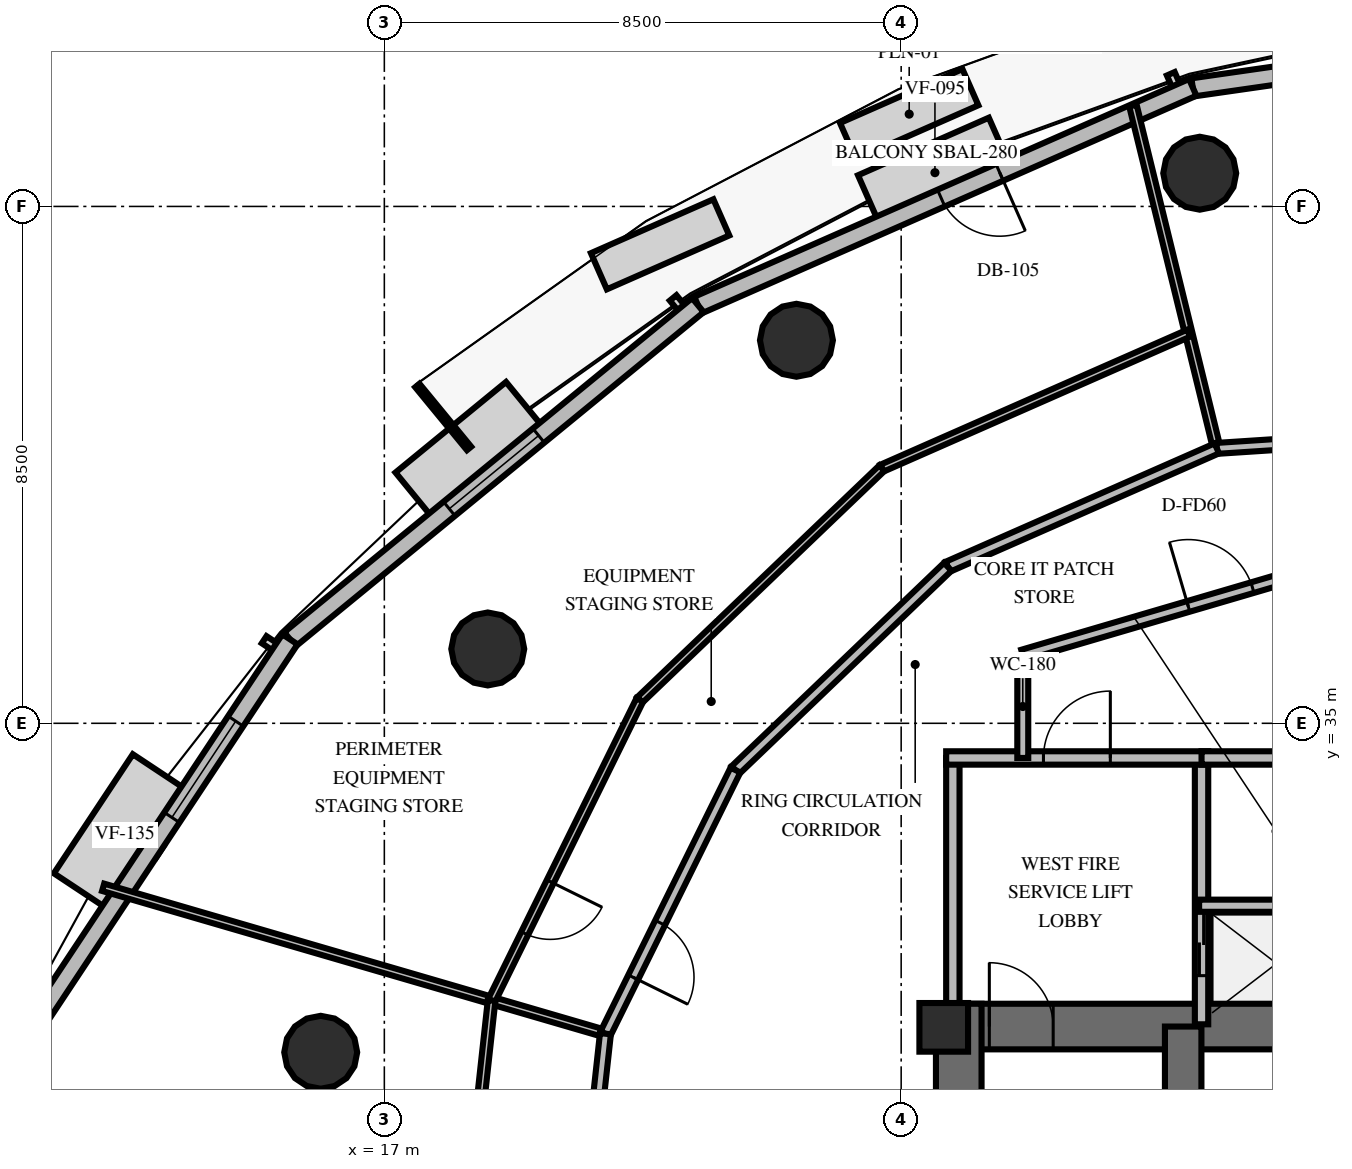
"""IFC4 building model, lengths in metres.
Left out: names, types, materials, properties, quantities, classifications, styles, units other than length and angle.
Written with IfcOpenShell. Run it as: python <this file> out.ifc"""

import sys

from ifc_helpers import new_model, si_unit, direction, frame, frame_2d, origin, origin_2d, place, context, subcontext, project, spatial, rectangle, circle, extrude, element, fill, save


model = new_model("IFC4")
c1 = context("Model", 3, precision=1e-05, world=origin(), true_north=direction((0.0, 1.0)))
c2 = subcontext(c1, "Body", "Model", "MODEL_VIEW")
j1 = project(units=[si_unit("LENGTHUNIT", "METRE"), si_unit("PLANEANGLEUNIT", "RADIAN")], contexts=[c1])
p1 = place(None, origin())
s1 = spatial("IfcSite", under=j1, at=p1, CompositionType="ELEMENT")
p2 = place(p1, origin())
s2 = spatial("IfcBuilding", under=s1, at=p2, CompositionType="ELEMENT")
p3 = place(p2, frame((0.0, 0.0, 133.8)))
s3 = spatial("IfcBuildingStorey", under=s2, at=p3, CompositionType="ELEMENT", Elevation=133.8)
p4 = place(p3, frame((26.072, 30.013, 0.0), z_axis=(0.0, 0.0, 1.0), x_axis=(1.0, 0.0, 0.0)))
e1 = element("IfcWall", 1, at=p4, inside=s3, PredefinedType="SHEAR", context=c2, shape_type="SweptSolid", body=[
    extrude(rectangle(XDim=15.866, YDim=0.75, at=frame_2d((7.933, 0.0))), origin(), (0.0, 0.0, 1.0), 4.0),
])
p5 = place(p4, frame((0.878, 0.0, 0.0)))
e2 = element("IfcOpeningElement", 2, at=p5, cuts=e1, PredefinedType="OPENING", context=c2, shape_type="SweptSolid", body=[
    extrude(rectangle(XDim=1.05, YDim=2.15, at=frame_2d((0.525, 1.075))), frame((0.0, 0.385, 0.0), z_axis=(0.0, -1.0, 0.0), x_axis=(1.0, 0.0, 0.0)), (0.0, 0.0, 1.0), 0.77),
])
p6 = place(p4, frame((13.928, 0.0, 0.0)))
e3 = element("IfcOpeningElement", 3, at=p6, cuts=e1, PredefinedType="OPENING", context=c2, shape_type="SweptSolid", body=[
    extrude(rectangle(XDim=1.05, YDim=2.15, at=frame_2d((0.525, 1.075))), frame((0.0, 0.385, 0.0), z_axis=(0.0, -1.0, 0.0), x_axis=(1.0, 0.0, 0.0)), (0.0, 0.0, 1.0), 0.77),
])
p7 = place(p4, frame((7.378, 0.0, 0.0)))
e4 = element("IfcOpeningElement", 4, at=p7, cuts=e1, PredefinedType="OPENING", context=c2, shape_type="SweptSolid", body=[
    extrude(rectangle(XDim=1.1, YDim=2.15, at=frame_2d((0.55, 1.075))), frame((0.0, 0.385, 0.0), z_axis=(0.0, -1.0, 0.0), x_axis=(1.0, 0.0, 0.0)), (0.0, 0.0, 1.0), 0.77),
])
p8 = place(p3, frame((26.447, 19.812, 0.0), z_axis=(0.0, 0.0, 1.0), x_axis=(0.0, 1.0, 0.0)))
e5 = element("IfcWall", 5, at=p8, inside=s3, PredefinedType="SHEAR", context=c2, shape_type="SweptSolid", body=[
    extrude(rectangle(XDim=10.576, YDim=0.75, at=frame_2d((5.288, 0.0))), origin(), (0.0, 0.0, 1.0), 4.0),
])
p9 = place(p3, frame((30.138, 20.187, 0.0), z_axis=(0.0, 0.0, 1.0), x_axis=(0.0, 1.0, 0.0)))
e6 = element("IfcWall", 6, at=p9, inside=s3, PredefinedType="SHEAR", context=c2, shape_type="SweptSolid", body=[
    extrude(rectangle(XDim=9.826, YDim=0.6, at=frame_2d((4.913, 0.0))), origin(), (0.0, 0.0, 1.0), 4.0),
])
p10 = place(p3, frame((26.2, 30.0, 0.0), z_axis=(0.0, 0.0, 1.0), x_axis=(1.0, 0.0, 0.0)))
e7 = element("IfcColumn", 7, at=p10, inside=s3, PredefinedType="PILASTER", context=c2, shape_type="SweptSolid", body=[
    extrude(rectangle(XDim=0.8, YDim=0.8, at=origin_2d()), origin(), (0.0, 0.0, 1.0), 4.0),
])
for number, where, z_axis, x_axis in (
    (8, (30.41, 44.046, 0.0), (0.0, 0.0, 1.0), (1.0, 0.0, 0.0)),
    (9, (23.778, 41.299, 0.0), (0.0, 0.0, 1.0), (1.0, 0.0, 0.0)),
    (10, (18.701, 36.222, 0.0), (0.0, 0.0, 1.0), (1.0, 0.0, 0.0)),
    (11, (15.954, 29.59, 0.0), (0.0, 0.0, 1.0), (1.0, 0.0, 0.0)),
):
    element("IfcColumn", number, at=place(p3, frame(where, z_axis=z_axis, x_axis=x_axis)), inside=s3, PredefinedType="COLUMN", context=c2, shape_type="SweptSolid", body=[
        extrude(circle(Radius=0.6, at=origin_2d()), origin(), (0.0, 0.0, 1.0), 4.0),
    ])
p11 = place(p3, frame((38.88, 46.692, 0.0), z_axis=(0.0, 0.0, 1.0), x_axis=(-0.989832051035, -0.142241030455, 0.0)))
e12 = element("IfcWall", 12, at=p11, inside=s3, PredefinedType="SOLIDWALL", context=c2, shape_type="SweptSolid", body=[
    extrude(rectangle(XDim=8.673, YDim=0.3, at=frame_2d((4.336, 0.0))), origin(), (0.0, 0.0, 1.0), 2.9),
])
p12 = place(p11, frame((3.386, 0.0, 0.8)))
e13 = element("IfcOpeningElement", 13, at=p12, cuts=e12, PredefinedType="OPENING", context=c2, shape_type="SweptSolid", body=[
    extrude(rectangle(XDim=1.9, YDim=1.95, at=frame_2d((0.95, 0.975))), frame((0.0, 0.16, 0.0), z_axis=(0.0, -1.0, 0.0), x_axis=(1.0, 0.0, 0.0)), (0.0, 0.0, 1.0), 0.32),
])
p13 = place(p3, frame((30.295, 45.458, 0.0), z_axis=(0.0, 0.0, 1.0), x_axis=(-0.915305719245, -0.402759779916, 0.0)))
e14 = element("IfcWall", 14, at=p13, inside=s3, PredefinedType="SOLIDWALL", context=c2, shape_type="SweptSolid", body=[
    extrude(rectangle(XDim=8.891, YDim=0.3, at=frame_2d((4.445, 0.0))), origin(), (0.0, 0.0, 1.0), 2.9),
])
p14 = place(p13, frame((3.47, 0.0, 0.0)))
e15 = element("IfcOpeningElement", 15, at=p14, cuts=e14, PredefinedType="OPENING", context=c2, shape_type="SweptSolid", body=[
    extrude(rectangle(XDim=1.05, YDim=2.15, at=frame_2d((0.525, 1.075))), frame((0.0, 0.16, 0.0), z_axis=(0.0, -1.0, 0.0), x_axis=(1.0, 0.0, 0.0)), (0.0, 0.0, 1.0), 0.32),
])
p15 = place(p3, frame((22.157, 41.877, 0.0), z_axis=(0.0, 0.0, 1.0), x_axis=(-0.773602244152, -0.633671498367, 0.0)))
e16 = element("IfcWall", 16, at=p15, inside=s3, PredefinedType="SOLIDWALL", context=c2, shape_type="SweptSolid", body=[
    extrude(rectangle(XDim=8.673, YDim=0.3, at=frame_2d((4.336, 0.0))), origin(), (0.0, 0.0, 1.0), 2.9),
])
p16 = place(p15, frame((3.386, 0.0, 0.8)))
e17 = element("IfcOpeningElement", 17, at=p16, cuts=e16, PredefinedType="OPENING", context=c2, shape_type="SweptSolid", body=[
    extrude(rectangle(XDim=1.9, YDim=1.95, at=frame_2d((0.95, 0.975))), frame((0.0, 0.16, 0.0), z_axis=(0.0, -1.0, 0.0), x_axis=(1.0, 0.0, 0.0)), (0.0, 0.0, 1.0), 0.32),
])
p17 = place(p3, frame((15.448, 36.381, 0.0), z_axis=(0.0, 0.0, 1.0), x_axis=(-0.552401321334, -0.833578298775, 0.0)))
e18 = element("IfcWall", 18, at=p17, inside=s3, PredefinedType="SOLIDWALL", context=c2, shape_type="SweptSolid", body=[
    extrude(rectangle(XDim=8.095, YDim=0.3, at=frame_2d((4.047, 0.0))), origin(), (0.0, 0.0, 1.0), 2.9),
])
p18 = place(p17, frame((1.615, 0.0, 0.8)))
e19 = element("IfcOpeningElement", 19, at=p18, cuts=e18, PredefinedType="OPENING", context=c2, shape_type="SweptSolid", body=[
    extrude(rectangle(XDim=1.9, YDim=1.95, at=frame_2d((0.95, 0.975))), frame((0.0, 0.16, 0.0), z_axis=(0.0, -1.0, 0.0), x_axis=(1.0, 0.0, 0.0)), (0.0, 0.0, 1.0), 0.32),
])
p19 = place(p3, frame((26.35, 30.05, 0.0), z_axis=(0.0, 0.0, 1.0), x_axis=(0.0, 1.0, 0.0)))
e20 = element("IfcWall", 20, at=p19, inside=s3, PredefinedType="SOLIDWALL", context=c2, shape_type="SweptSolid", body=[
    extrude(rectangle(XDim=4.38, YDim=0.22, at=frame_2d((2.19, 0.0))), origin(), (0.0, 0.0, 1.0), 2.8),
])
p20 = place(p3, frame((30.44, 30.05, 0.0), z_axis=(0.0, 0.0, 1.0), x_axis=(0.0, 1.0, 0.0)))
e21 = element("IfcWall", 21, at=p20, inside=s3, PredefinedType="SOLIDWALL", context=c2, shape_type="SweptSolid", body=[
    extrude(rectangle(XDim=4.38, YDim=0.22, at=frame_2d((2.19, 0.0))), origin(), (0.0, 0.0, 1.0), 2.8),
])
p21 = place(p20, frame((0.8, 0.0, 0.0)))
e22 = element("IfcOpeningElement", 22, at=p21, cuts=e21, PredefinedType="OPENING", context=c2, shape_type="SweptSolid", body=[
    extrude(rectangle(XDim=1.05, YDim=2.1, at=frame_2d((0.525, 1.05))), frame((0.0, 0.12, 0.0), z_axis=(0.0, -1.0, 0.0), x_axis=(1.0, 0.0, 0.0)), (0.0, 0.0, 1.0), 0.24),
])
p22 = place(p3, frame((26.24, 34.43, 0.0), z_axis=(0.0, 0.0, 1.0), x_axis=(1.0, 0.0, 0.0)))
e23 = element("IfcWall", 23, at=p22, inside=s3, PredefinedType="SOLIDWALL", context=c2, shape_type="SweptSolid", body=[
    extrude(rectangle(XDim=4.31, YDim=0.22, at=frame_2d((2.155, 0.0))), origin(), (0.0, 0.0, 1.0), 2.8),
])
p23 = place(p22, frame((1.6, 0.0, 0.0)))
e24 = element("IfcOpeningElement", 24, at=p23, cuts=e23, PredefinedType="OPENING", context=c2, shape_type="SweptSolid", body=[
    extrude(rectangle(XDim=1.1, YDim=2.15, at=frame_2d((0.55, 1.075))), frame((0.0, 0.12, 0.0), z_axis=(0.0, -1.0, 0.0), x_axis=(1.0, 0.0, 0.0)), (0.0, 0.0, 1.0), 0.24),
])
p24 = place(p3, frame((30.4, 32.0, 0.0), z_axis=(0.0, 0.0, 1.0), x_axis=(1.0, 0.0, 0.0)))
e25 = element("IfcWall", 25, at=p24, inside=s3, PredefinedType="SOLIDWALL", context=c2, shape_type="SweptSolid", body=[
    extrude(rectangle(XDim=2.55, YDim=0.2, at=frame_2d((1.275, 0.0))), origin(), (0.0, 0.0, 1.0), 2.8),
])
p25 = place(p3, frame((30.44, 34.43, 0.0), z_axis=(0.0, 0.0, 1.0), x_axis=(1.0, 0.0, 0.0)))
e26 = element("IfcWall", 26, at=p25, inside=s3, PredefinedType="SOLIDWALL", context=c2, shape_type="SweptSolid", body=[
    extrude(rectangle(XDim=7.12, YDim=0.22, at=frame_2d((3.56, 0.0))), origin(), (0.0, 0.0, 1.0), 2.8),
])
p26 = place(p25, frame((3.01, 0.0, 0.0)))
e27 = element("IfcOpeningElement", 27, at=p26, cuts=e26, PredefinedType="OPENING", context=c2, shape_type="SweptSolid", body=[
    extrude(rectangle(XDim=1.1, YDim=2.15, at=frame_2d((0.55, 1.075))), frame((0.0, 0.12, 0.0), z_axis=(0.0, -1.0, 0.0), x_axis=(1.0, 0.0, 0.0)), (0.0, 0.0, 1.0), 0.24),
])
p27 = place(p3, frame((27.5, 34.43, 0.0), z_axis=(0.0, 0.0, 1.0), x_axis=(0.0, 1.0, 0.0)))
e28 = element("IfcWall", 28, at=p27, inside=s3, PredefinedType="PARTITIONING", context=c2, shape_type="SweptSolid", body=[
    extrude(rectangle(XDim=1.693, YDim=0.18, at=frame_2d((0.846, 0.0))), origin(), (0.0, 0.0, 1.0), 2.8),
])
p28 = place(p3, frame((27.5, 36.123, 0.0), z_axis=(0.0, 0.0, 1.0), x_axis=(0.959546654541, 0.281549671923, 0.0)))
e29 = element("IfcWall", 29, at=p28, inside=s3, PredefinedType="PARTITIONING", context=c2, shape_type="SweptSolid", body=[
    extrude(rectangle(XDim=6.774, YDim=0.18, at=frame_2d((3.387, 0.0))), origin(), (0.0, 0.0, 1.0), 2.8),
])
p29 = place(p28, frame((2.837, 0.0, 0.0)))
e30 = element("IfcOpeningElement", 30, at=p29, cuts=e29, PredefinedType="OPENING", context=c2, shape_type="SweptSolid", body=[
    extrude(rectangle(XDim=1.1, YDim=2.15, at=frame_2d((0.55, 1.075))), frame((0.0, 0.1, 0.0), z_axis=(0.0, -1.0, 0.0), x_axis=(1.0, 0.0, 0.0)), (0.0, 0.0, 1.0), 0.2),
])
p30 = place(p3, frame((30.691, 39.521, 0.0), z_axis=(0.0, 0.0, 1.0), x_axis=(-0.23768243705, 0.971342915307, 0.0)))
e31 = element("IfcWall", 31, at=p30, inside=s3, PredefinedType="PARTITIONING", context=c2, shape_type="SweptSolid", body=[
    extrude(rectangle(XDim=5.803, YDim=0.125, at=frame_2d((2.902, 0.0))), origin(), (0.0, 0.0, 1.0), 2.8),
])
p31 = place(p3, frame((35.515, 39.837, 0.0), z_axis=(0.0, 0.0, 1.0), x_axis=(-0.997855867804, -0.065449729474, 0.0)))
e32 = element("IfcWall", 32, at=p31, inside=s3, PredefinedType="PARTITIONING", context=c2, shape_type="SweptSolid", body=[
    extrude(rectangle(XDim=4.834, YDim=0.18, at=frame_2d((2.417, 0.0))), origin(), (0.0, 0.0, 1.0), 2.8),
])
p32 = place(p31, frame((0.996, 0.0, 0.0)))
e33 = element("IfcOpeningElement", 33, at=p32, cuts=e32, PredefinedType="OPENING", context=c2, shape_type="SweptSolid", body=[
    extrude(rectangle(XDim=1.15, YDim=2.15, at=frame_2d((0.575, 1.075))), frame((0.0, 0.1, 0.0), z_axis=(0.0, -1.0, 0.0), x_axis=(1.0, 0.0, 0.0)), (0.0, 0.0, 1.0), 0.2),
])
p33 = place(p3, frame((20.636, 29.895, 0.0), z_axis=(0.0, 0.0, 1.0), x_axis=(-0.960054321728, 0.279813686819, 0.0)))
e34 = element("IfcWall", 34, at=p33, inside=s3, PredefinedType="PARTITIONING", context=c2, shape_type="SweptSolid", body=[
    extrude(rectangle(XDim=8.605, YDim=0.125, at=frame_2d((4.302, 0.0))), origin(), (0.0, 0.0, 1.0), 2.8),
])
p34 = place(p3, frame((30.691, 39.521, 0.0), z_axis=(0.0, 0.0, 1.0), x_axis=(-0.915325457772, -0.402714919459, 0.0)))
e35 = element("IfcWall", 35, at=p34, inside=s3, PredefinedType="PARTITIONING", context=c2, shape_type="SweptSolid", body=[
    extrude(rectangle(XDim=4.834, YDim=0.18, at=frame_2d((2.417, 0.0))), origin(), (0.0, 0.0, 1.0), 2.8),
])
p35 = place(p3, frame((26.267, 37.574, 0.0), z_axis=(0.0, 0.0, 1.0), x_axis=(-0.722341285912, -0.691536742818, 0.0)))
e36 = element("IfcWall", 36, at=p35, inside=s3, PredefinedType="PARTITIONING", context=c2, shape_type="SweptSolid", body=[
    extrude(rectangle(XDim=4.834, YDim=0.18, at=frame_2d((2.417, 0.0))), origin(), (0.0, 0.0, 1.0), 2.8),
])
p36 = place(p3, frame((22.774, 34.231, 0.0), z_axis=(0.0, 0.0, 1.0), x_axis=(-0.442338670076, -0.896848092463, 0.0)))
e37 = element("IfcWall", 37, at=p36, inside=s3, PredefinedType="PARTITIONING", context=c2, shape_type="SweptSolid", body=[
    extrude(rectangle(XDim=4.834, YDim=0.18, at=frame_2d((2.417, 0.0))), origin(), (0.0, 0.0, 1.0), 2.8),
])
p37 = place(p36, frame((2.801, 0.0, 0.0)))
e38 = element("IfcOpeningElement", 38, at=p37, cuts=e37, PredefinedType="OPENING", context=c2, shape_type="SweptSolid", body=[
    extrude(rectangle(XDim=1.0, YDim=2.15, at=frame_2d((0.5, 1.075))), frame((0.0, 0.1, 0.0), z_axis=(0.0, -1.0, 0.0), x_axis=(1.0, 0.0, 0.0)), (0.0, 0.0, 1.0), 0.2),
])
p38 = place(p3, frame((30.228, 41.415, 0.0), z_axis=(0.0, 0.0, 1.0), x_axis=(-0.915294129994, -0.402786116442, 0.0)))
e39 = element("IfcWall", 39, at=p38, inside=s3, PredefinedType="PARTITIONING", context=c2, shape_type="SweptSolid", body=[
    extrude(rectangle(XDim=5.511, YDim=0.125, at=frame_2d((2.756, 0.0))), origin(), (0.0, 0.0, 1.0), 2.8),
])
p39 = place(p3, frame((25.183, 39.195, 0.0), z_axis=(0.0, 0.0, 1.0), x_axis=(-0.722375329224, -0.691501181292, 0.0)))
e40 = element("IfcWall", 40, at=p39, inside=s3, PredefinedType="PARTITIONING", context=c2, shape_type="SweptSolid", body=[
    extrude(rectangle(XDim=5.512, YDim=0.125, at=frame_2d((2.756, 0.0))), origin(), (0.0, 0.0, 1.0), 2.8),
])
p40 = place(p3, frame((21.202, 35.384, 0.0), z_axis=(0.0, 0.0, 1.0), x_axis=(-0.442298829349, -0.896867741396, 0.0)))
e41 = element("IfcWall", 41, at=p40, inside=s3, PredefinedType="PARTITIONING", context=c2, shape_type="SweptSolid", body=[
    extrude(rectangle(XDim=5.511, YDim=0.125, at=frame_2d((2.756, 0.0))), origin(), (0.0, 0.0, 1.0), 2.8),
])
p41 = place(p40, frame((3.331, 0.0, 0.0)))
e42 = element("IfcOpeningElement", 42, at=p41, cuts=e41, PredefinedType="OPENING", context=c2, shape_type="SweptSolid", body=[
    extrude(rectangle(XDim=0.95, YDim=2.15, at=frame_2d((0.475, 1.075))), frame((0.0, 0.073, 0.0), z_axis=(0.0, -1.0, 0.0), x_axis=(1.0, 0.0, 0.0)), (0.0, 0.0, 1.0), 0.145),
])
p42 = place(p3, frame((20.636, 29.895, 0.0), z_axis=(0.0, 0.0, 1.0), x_axis=(-0.108829517581, -0.994060428799, 0.0)))
e43 = element("IfcWall", 43, at=p42, inside=s3, PredefinedType="PARTITIONING", context=c2, shape_type="SweptSolid", body=[
    extrude(rectangle(XDim=4.834, YDim=0.18, at=frame_2d((2.417, 0.0))), origin(), (0.0, 0.0, 1.0), 2.8),
])
p43 = place(p42, frame((2.801, 0.0, 0.0)))
e44 = element("IfcOpeningElement", 44, at=p43, cuts=e43, PredefinedType="OPENING", context=c2, shape_type="SweptSolid", body=[
    extrude(rectangle(XDim=1.0, YDim=2.15, at=frame_2d((0.5, 1.075))), frame((0.0, 0.1, 0.0), z_axis=(0.0, -1.0, 0.0), x_axis=(1.0, 0.0, 0.0)), (0.0, 0.0, 1.0), 0.2),
])
p44 = place(p3, frame((18.764, 30.441, 0.0), z_axis=(0.0, 0.0, 1.0), x_axis=(-0.108836706904, -0.994059641687, 0.0)))
e45 = element("IfcWall", 45, at=p44, inside=s3, PredefinedType="PARTITIONING", context=c2, shape_type="SweptSolid", body=[
    extrude(rectangle(XDim=5.511, YDim=0.125, at=frame_2d((2.756, 0.0))), origin(), (0.0, 0.0, 1.0), 2.8),
])
p45 = place(p44, frame((3.331, 0.0, 0.0)))
e46 = element("IfcOpeningElement", 46, at=p45, cuts=e45, PredefinedType="OPENING", context=c2, shape_type="SweptSolid", body=[
    extrude(rectangle(XDim=0.95, YDim=2.15, at=frame_2d((0.475, 1.075))), frame((0.0, 0.073, 0.0), z_axis=(0.0, -1.0, 0.0), x_axis=(1.0, 0.0, 0.0)), (0.0, 0.0, 1.0), 0.145),
])
p46 = place(p14, origin())
e47 = element("IfcDoor", 47, at=p46, inside=s3, OperationType="SINGLE_SWING_LEFT", PredefinedType="DOOR", context=c2, shape_type="SweptSolid", body=[
    extrude(rectangle(XDim=1.05, YDim=2.15, at=frame_2d((0.525, 1.075))), frame((0.0, 0.025, 0.0), z_axis=(0.0, -1.0, 0.0), x_axis=(1.0, 0.0, 0.0)), (0.0, 0.0, 1.0), 0.05),
])
fill(e15, e47)
p47 = place(p16, origin())
e48 = element("IfcWindow", 48, at=p47, inside=s3, PartitioningType="SINGLE_PANEL", PredefinedType="WINDOW", context=c2, shape_type="SweptSolid", body=[
    extrude(rectangle(XDim=1.9, YDim=1.95, at=frame_2d((0.95, 0.975))), frame((0.0, 0.03, 0.0), z_axis=(0.0, -1.0, 0.0), x_axis=(1.0, 0.0, 0.0)), (0.0, 0.0, 1.0), 0.06),
])
fill(e17, e48)
p48 = place(p18, origin())
e49 = element("IfcWindow", 49, at=p48, inside=s3, PartitioningType="SINGLE_PANEL", PredefinedType="WINDOW", context=c2, shape_type="SweptSolid", body=[
    extrude(rectangle(XDim=1.9, YDim=1.95, at=frame_2d((0.95, 0.975))), frame((0.0, 0.03, 0.0), z_axis=(0.0, -1.0, 0.0), x_axis=(1.0, 0.0, 0.0)), (0.0, 0.0, 1.0), 0.06),
])
fill(e19, e49)
p49 = place(p5, origin())
e50 = element("IfcDoor", 50, at=p49, inside=s3, OperationType="SINGLE_SWING_LEFT", PredefinedType="DOOR", context=c2, shape_type="SweptSolid", body=[
    extrude(rectangle(XDim=1.05, YDim=2.15, at=frame_2d((0.525, 1.075))), frame((0.0, 0.025, 0.0), z_axis=(0.0, -1.0, 0.0), x_axis=(1.0, 0.0, 0.0)), (0.0, 0.0, 1.0), 0.05),
])
fill(e2, e50)
p50 = place(p23, origin())
e51 = element("IfcDoor", 51, at=p50, inside=s3, OperationType="SINGLE_SWING_RIGHT", PredefinedType="DOOR", context=c2, shape_type="SweptSolid", body=[
    extrude(rectangle(XDim=1.1, YDim=2.15, at=frame_2d((0.55, 1.075))), frame((0.0, 0.025, 0.0), z_axis=(0.0, -1.0, 0.0), x_axis=(1.0, 0.0, 0.0)), (0.0, 0.0, 1.0), 0.05),
])
fill(e24, e51)
p51 = place(p21, origin())
e52 = element("IfcDoor", 52, at=p51, inside=s3, OperationType="DOUBLE_DOOR_SLIDING", PredefinedType="USERDEFINED", context=c2, shape_type="SweptSolid", body=[
    extrude(rectangle(XDim=1.05, YDim=2.1, at=frame_2d((0.525, 1.05))), frame((0.0, 0.025, 0.0), z_axis=(0.0, -1.0, 0.0), x_axis=(1.0, 0.0, 0.0)), (0.0, 0.0, 1.0), 0.05),
])
fill(e22, e52)
p52 = place(p29, origin())
e53 = element("IfcDoor", 53, at=p52, inside=s3, OperationType="SINGLE_SWING_LEFT", PredefinedType="DOOR", context=c2, shape_type="SweptSolid", body=[
    extrude(rectangle(XDim=1.1, YDim=2.15, at=frame_2d((0.55, 1.075))), frame((0.0, 0.025, 0.0), z_axis=(0.0, -1.0, 0.0), x_axis=(1.0, 0.0, 0.0)), (0.0, 0.0, 1.0), 0.05),
])
fill(e30, e53)
p53 = place(p37, origin())
e54 = element("IfcDoor", 54, at=p53, inside=s3, OperationType="SINGLE_SWING_RIGHT", PredefinedType="DOOR", context=c2, shape_type="SweptSolid", body=[
    extrude(rectangle(XDim=1.0, YDim=2.15, at=frame_2d((0.5, 1.075))), frame((0.0, 0.025, 0.0), z_axis=(0.0, -1.0, 0.0), x_axis=(1.0, 0.0, 0.0)), (0.0, 0.0, 1.0), 0.05),
])
fill(e38, e54)
p54 = place(p41, origin())
e55 = element("IfcDoor", 55, at=p54, inside=s3, OperationType="SINGLE_SWING_LEFT", PredefinedType="DOOR", context=c2, shape_type="SweptSolid", body=[
    extrude(rectangle(XDim=0.95, YDim=2.15, at=frame_2d((0.475, 1.075))), frame((0.0, 0.025, 0.0), z_axis=(0.0, -1.0, 0.0), x_axis=(1.0, 0.0, 0.0)), (0.0, 0.0, 1.0), 0.05),
])
fill(e42, e55)
save(model, sys.argv[1])
